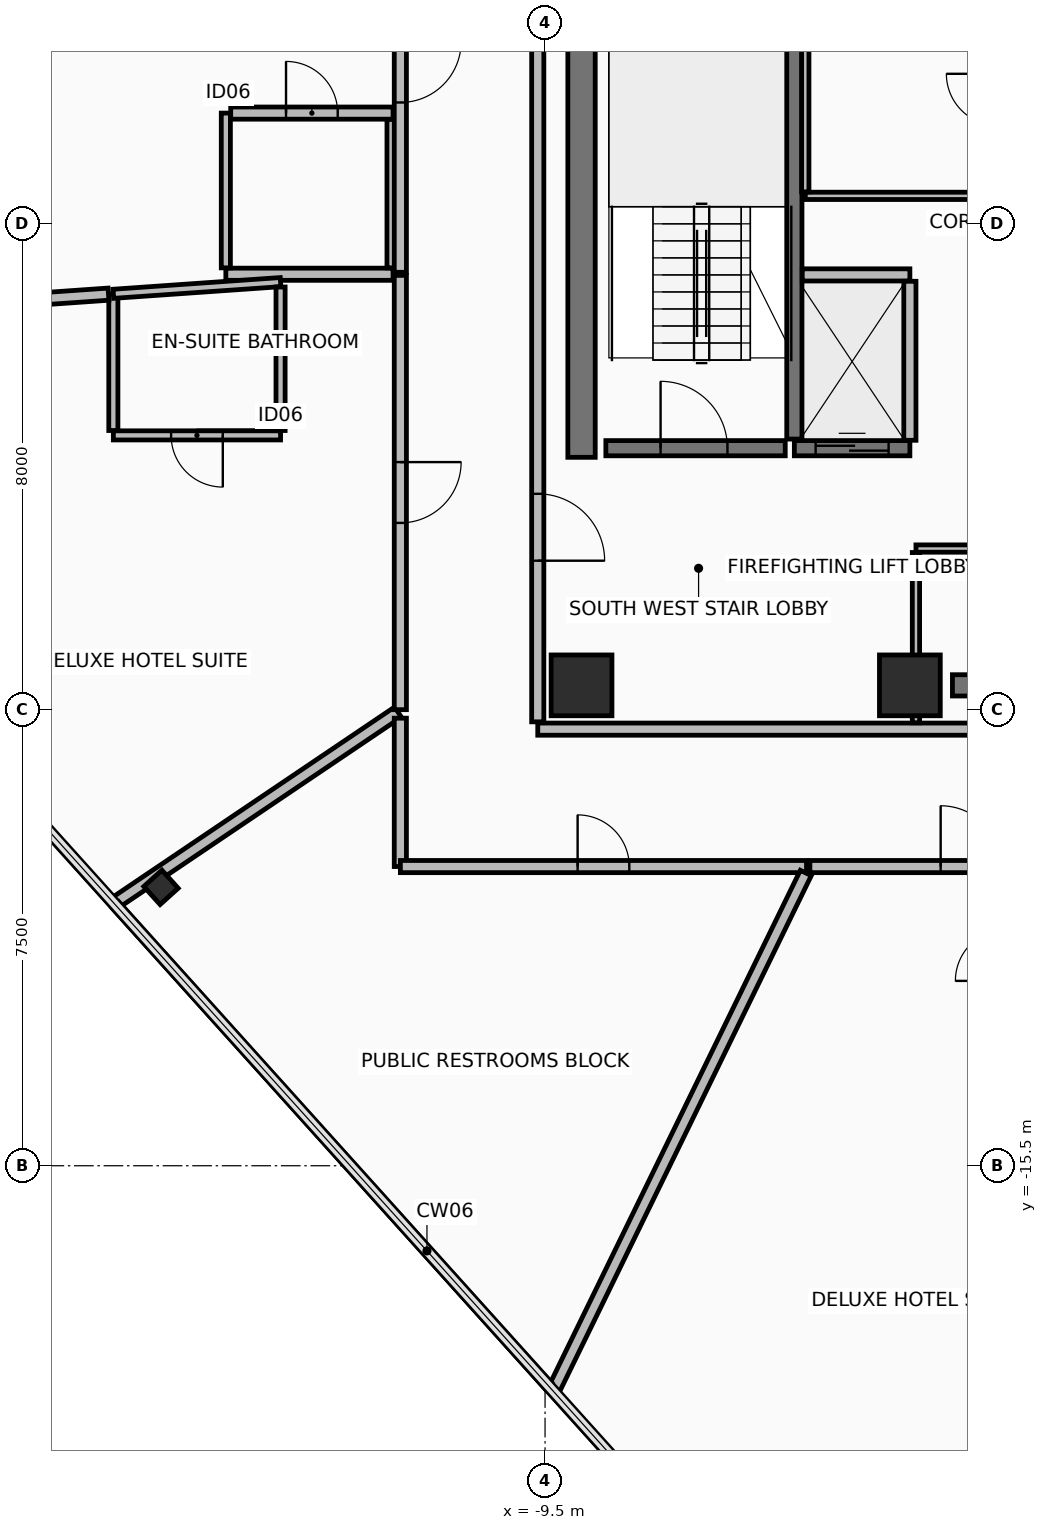
"""IFC4 building model, lengths in metres.
Left out: names, types, materials, properties, quantities, classifications, styles, units other than length and angle.
Written with IfcOpenShell. Run it as: python <this file> out.ifc"""

import sys

from ifc_helpers import new_model, si_unit, direction, frame, frame_2d, origin, origin_2d, place, context, subcontext, project, spatial, rectangle, hollow_rectangle, extrude, element, fill, save


model = new_model("IFC4")
c1 = context("Model", 3, precision=1e-05, world=origin(), true_north=direction((0.0, 1.0)))
c2 = subcontext(c1, "Body", "Model", "MODEL_VIEW")
j1 = project(units=[si_unit("LENGTHUNIT", "METRE"), si_unit("PLANEANGLEUNIT", "RADIAN")], contexts=[c1])
p1 = place(None, origin())
s1 = spatial("IfcSite", under=j1, at=p1, CompositionType="ELEMENT")
p2 = place(p1, origin())
s2 = spatial("IfcBuilding", under=s1, at=p2, CompositionType="ELEMENT")
p3 = place(p2, frame((0.0, 0.0, 279.75)))
s3 = spatial("IfcBuildingStorey", under=s2, at=p3, CompositionType="ELEMENT", Elevation=279.75)
for number, where, z_axis, x_axis in (
    (1, (-8.9, -7.6, 0.0), (0.0, 0.0, 1.0), (1.0, 0.0, 0.0)),
    (2, (-3.5, -7.6, 0.0), (0.0, 0.0, 1.0), (1.0, 0.0, 0.0)),
):
    element("IfcColumn", number, at=place(p3, frame(where, z_axis=z_axis, x_axis=x_axis)), inside=s3, PredefinedType="COLUMN", context=c2, shape_type="SweptSolid", body=[
        extrude(rectangle(XDim=1.0, YDim=1.0, at=origin_2d()), origin(), (0.0, 0.0, 1.0), 3.65),
    ])
p4 = place(p3, frame((-15.816, -10.922, -0.19), z_axis=(0.0, 0.0, 1.0), x_axis=(-0.669130606359, 0.743144825477, 0.0)))
e3 = element("IfcColumn", 3, at=p4, inside=s3, PredefinedType="COLUMN", context=c2, shape_type="SweptSolid", body=[
    extrude(hollow_rectangle(XDim=0.4, YDim=0.4, WallThickness=0.025, at=origin_2d()), origin(), (0.0, 0.0, 1.0), 3.84),
])
p5 = place(p3, frame((-2.8, -7.6, 0.0), z_axis=(0.0, 0.0, 1.0), x_axis=(1.0, 0.0, 0.0)))
e4 = element("IfcWall", 4, at=p5, inside=s3, PredefinedType="SHEAR", context=c2, shape_type="SweptSolid", body=[
    extrude(rectangle(XDim=5.38, YDim=0.35, at=frame_2d((2.69, 0.0))), origin(), (0.0, 0.0, 1.0), 3.465),
])
p6 = place(p3, frame((-8.9, -3.85, 0.0), z_axis=(0.0, 0.0, 1.0), x_axis=(0.0, 1.0, 0.0)))
e5 = element("IfcWall", 5, at=p6, inside=s3, PredefinedType="SHEAR", context=c2, shape_type="SweptSolid", body=[
    extrude(rectangle(XDim=10.7, YDim=0.45, at=frame_2d((5.35, 0.0))), origin(), (0.0, 0.0, 1.0), 3.465),
])
p7 = place(p3, frame((-9.62, -8.32, 0.0), z_axis=(0.0, 0.0, 1.0), x_axis=(1.0, 0.0, 0.0)))
e6 = element("IfcWall", 6, at=p7, inside=s3, PredefinedType="PARTITIONING", context=c2, shape_type="SweptSolid", body=[
    extrude(rectangle(XDim=19.24, YDim=0.2, at=frame_2d((9.62, 0.0))), origin(), (0.0, 0.0, 1.0), 2.96),
])
p8 = place(p7, frame((7.37, 0.0, 0.0)))
e7 = element("IfcOpeningElement", 7, at=p8, cuts=e6, PredefinedType="OPENING", context=c2, shape_type="SweptSolid", body=[
    extrude(rectangle(XDim=0.9, YDim=2.1, at=frame_2d((0.45, 1.05))), frame((0.0, 0.11, 0.0), z_axis=(0.0, -1.0, 0.0), x_axis=(1.0, 0.0, 0.0)), (0.0, 0.0, 1.0), 0.22),
])
p9 = place(p7, frame((10.77, 0.0, 0.0)))
e8 = element("IfcOpeningElement", 8, at=p9, cuts=e6, PredefinedType="OPENING", context=c2, shape_type="SweptSolid", body=[
    extrude(rectangle(XDim=0.9, YDim=2.1, at=frame_2d((0.45, 1.05))), frame((0.0, 0.11, 0.0), z_axis=(0.0, -1.0, 0.0), x_axis=(1.0, 0.0, 0.0)), (0.0, 0.0, 1.0), 0.22),
])
p10 = place(p7, frame((13.97, 0.0, 0.0)))
e9 = element("IfcOpeningElement", 9, at=p10, cuts=e6, PredefinedType="OPENING", context=c2, shape_type="SweptSolid", body=[
    extrude(rectangle(XDim=0.9, YDim=2.1, at=frame_2d((0.45, 1.05))), frame((0.0, 0.11, 0.0), z_axis=(0.0, -1.0, 0.0), x_axis=(1.0, 0.0, 0.0)), (0.0, 0.0, 1.0), 0.22),
])
p11 = place(p3, frame((-9.62, 8.2, 0.0), z_axis=(0.0, 0.0, 1.0), x_axis=(0.0, -1.0, 0.0)))
e10 = element("IfcWall", 10, at=p11, inside=s3, PredefinedType="PARTITIONING", context=c2, shape_type="SweptSolid", body=[
    extrude(rectangle(XDim=16.4, YDim=0.2, at=frame_2d((8.2, 0.0))), origin(), (0.0, 0.0, 1.0), 2.81),
])
p12 = place(p11, frame((12.65, 0.0, 0.0)))
e11 = element("IfcOpeningElement", 11, at=p12, cuts=e10, PredefinedType="OPENING", context=c2, shape_type="SweptSolid", body=[
    extrude(rectangle(XDim=1.1, YDim=2.15, at=frame_2d((0.55, 1.075))), frame((0.0, 0.11, 0.0), z_axis=(0.0, -1.0, 0.0), x_axis=(1.0, 0.0, 0.0)), (0.0, 0.0, 1.0), 0.22),
])
p13 = place(p3, frame((-5.4, -3.55, 0.0), z_axis=(0.0, 0.0, 1.0), x_axis=(0.0, 1.0, 0.0)))
e12 = element("IfcWall", 12, at=p13, inside=s3, PredefinedType="SHEAR", context=c2, shape_type="SweptSolid", body=[
    extrude(rectangle(XDim=7.3, YDim=0.25, at=frame_2d((3.65, 0.0))), origin(), (0.0, 0.0, 1.0), 3.465),
])
p14 = place(p3, frame((-8.5, -3.7, 0.0), z_axis=(0.0, 0.0, 1.0), x_axis=(1.0, 0.0, 0.0)))
e13 = element("IfcWall", 13, at=p14, inside=s3, PredefinedType="SHEAR", context=c2, shape_type="SweptSolid", body=[
    extrude(rectangle(XDim=2.95, YDim=0.25, at=frame_2d((1.475, 0.0))), origin(), (0.0, 0.0, 1.0), 3.465),
])
p15 = place(p14, frame((0.9, 0.0, 0.0)))
e14 = element("IfcOpeningElement", 14, at=p15, cuts=e13, PredefinedType="OPENING", context=c2, shape_type="SweptSolid", body=[
    extrude(rectangle(XDim=1.1, YDim=2.15, at=frame_2d((0.55, 1.075))), frame((0.0, 0.135, 0.0), z_axis=(0.0, -1.0, 0.0), x_axis=(1.0, 0.0, 0.0)), (0.0, 0.0, 1.0), 0.27),
])
p16 = place(p3, frame((-5.4, -3.7, 0.0), z_axis=(0.0, 0.0, 1.0), x_axis=(1.0, 0.0, 0.0)))
e15 = element("IfcWall", 15, at=p16, inside=s3, PredefinedType="SHEAR", context=c2, shape_type="SweptSolid", body=[
    extrude(rectangle(XDim=1.9, YDim=0.25, at=frame_2d((0.95, 0.0))), origin(), (0.0, 0.0, 1.0), 3.465),
])
p17 = place(p16, frame((0.35, 0.0, 0.0)))
e16 = element("IfcOpeningElement", 16, at=p17, cuts=e15, PredefinedType="OPENING", context=c2, shape_type="SweptSolid", body=[
    extrude(rectangle(XDim=1.2, YDim=2.2, at=frame_2d((0.6, 1.1))), frame((0.0, 0.135, 0.0), z_axis=(0.0, -1.0, 0.0), x_axis=(1.0, 0.0, 0.0)), (0.0, 0.0, 1.0), 0.27),
])
p18 = place(p3, frame((-5.27, -0.85, 0.0), z_axis=(0.0, 0.0, 1.0), x_axis=(1.0, 0.0, 0.0)))
e17 = element("IfcWall", 17, at=p18, inside=s3, PredefinedType="PARTITIONING", context=c2, shape_type="SweptSolid", body=[
    extrude(rectangle(XDim=1.77, YDim=0.2, at=frame_2d((0.885, 0.0))), origin(), (0.0, 0.0, 1.0), 3.465),
])
p19 = place(p3, frame((-3.5, -3.57, 0.0), z_axis=(0.0, 0.0, 1.0), x_axis=(0.0, 1.0, 0.0)))
e18 = element("IfcWall", 18, at=p19, inside=s3, PredefinedType="PARTITIONING", context=c2, shape_type="SweptSolid", body=[
    extrude(rectangle(XDim=2.615, YDim=0.2, at=frame_2d((1.308, 0.0))), origin(), (0.0, 0.0, 1.0), 3.465),
])
p20 = place(p3, frame((-5.22, 0.45, 0.0), z_axis=(0.0, 0.0, 1.0), x_axis=(1.0, 0.0, 0.0)))
e19 = element("IfcWall", 19, at=p20, inside=s3, PredefinedType="PARTITIONING", context=c2, shape_type="SweptSolid", body=[
    extrude(rectangle(XDim=3.17, YDim=0.12, at=frame_2d((1.585, 0.0))), origin(), (0.0, 0.0, 1.0), 3.465),
])
p21 = place(p3, frame((-5.22, 3.485, 0.0), z_axis=(0.0, 0.0, 1.0), x_axis=(0.0, -1.0, 0.0)))
e20 = element("IfcWall", 20, at=p21, inside=s3, PredefinedType="PARTITIONING", context=c2, shape_type="SweptSolid", body=[
    extrude(rectangle(XDim=2.97, YDim=0.12, at=frame_2d((1.485, 0.0))), origin(), (0.0, 0.0, 1.0), 3.465),
])
p22 = place(p3, frame((-0.265, -5.35, 0.0), z_axis=(0.0, 0.0, 1.0), x_axis=(-1.0, 0.0, 0.0)))
e21 = element("IfcWall", 21, at=p22, inside=s3, PredefinedType="PARTITIONING", context=c2, shape_type="SweptSolid", body=[
    extrude(rectangle(XDim=3.135, YDim=0.12, at=frame_2d((1.567, 0.0))), origin(), (0.0, 0.0, 1.0), 2.76),
])
p23 = place(p3, frame((-3.4, -5.415, 0.0), z_axis=(0.0, 0.0, 1.0), x_axis=(0.0, -1.0, 0.0)))
e22 = element("IfcWall", 22, at=p23, inside=s3, PredefinedType="PARTITIONING", context=c2, shape_type="SweptSolid", body=[
    extrude(rectangle(XDim=2.8, YDim=0.12, at=frame_2d((1.4, 0.0))), origin(), (0.0, 0.0, 1.0), 2.76),
])
p24 = place(p3, frame((-12.0, -0.839, 0.0), z_axis=(0.0, 0.0, 1.0), x_axis=(-1.0, 0.0, 0.0)))
e23 = element("IfcWall", 23, at=p24, inside=s3, PredefinedType="PARTITIONING", context=c2, shape_type="SweptSolid", body=[
    extrude(rectangle(XDim=2.75, YDim=0.2, at=frame_2d((1.375, 0.0))), origin(), (0.0, 0.0, 1.0), 3.465),
])
p25 = place(p3, frame((-14.75, -0.734, 0.0), z_axis=(0.0, 0.0, 1.0), x_axis=(0.0, 1.0, 0.0)))
e24 = element("IfcWall", 24, at=p25, inside=s3, PredefinedType="PARTITIONING", context=c2, shape_type="SweptSolid", body=[
    extrude(rectangle(XDim=2.545, YDim=0.15, at=frame_2d((1.272, 0.0))), origin(), (0.0, 0.0, 1.0), 3.465),
])
p26 = place(p3, frame((-14.67, 1.811, 0.0), z_axis=(0.0, 0.0, 1.0), x_axis=(1.0, 0.0, 0.0)))
e25 = element("IfcWall", 25, at=p26, inside=s3, PredefinedType="PARTITIONING", context=c2, shape_type="SweptSolid", body=[
    extrude(rectangle(XDim=2.67, YDim=0.2, at=frame_2d((1.335, 0.0))), origin(), (0.0, 0.0, 1.0), 3.465),
])
p27 = place(p26, frame((0.91, 0.0, 0.0)))
e26 = element("IfcOpeningElement", 26, at=p27, cuts=e25, PredefinedType="OPENING", context=c2, shape_type="SweptSolid", body=[
    extrude(rectangle(XDim=0.85, YDim=2.1, at=frame_2d((0.425, 1.05))), frame((0.0, 0.11, 0.0), z_axis=(0.0, -1.0, 0.0), x_axis=(1.0, 0.0, 0.0)), (0.0, 0.0, 1.0), 0.22),
])
p28 = place(p3, frame((-12.0, 1.706, 0.0), z_axis=(0.0, 0.0, 1.0), x_axis=(0.0, -1.0, 0.0)))
e27 = element("IfcWall", 27, at=p28, inside=s3, PredefinedType="PARTITIONING", context=c2, shape_type="SweptSolid", body=[
    extrude(rectangle(XDim=2.44, YDim=0.2, at=frame_2d((1.22, 0.0))), origin(), (0.0, 0.0, 1.0), 3.465),
])
p29 = place(p3, frame((-13.85, -3.489, 0.0), z_axis=(0.0, 0.0, 1.0), x_axis=(-1.0, 0.0, 0.0)))
e28 = element("IfcWall", 28, at=p29, inside=s3, PredefinedType="PARTITIONING", context=c2, shape_type="SweptSolid", body=[
    extrude(rectangle(XDim=2.75, YDim=0.15, at=frame_2d((1.375, 0.0))), origin(), (0.0, 0.0, 1.0), 3.22),
])
p30 = place(p29, frame((0.95, 0.0, 0.0)))
e29 = element("IfcOpeningElement", 29, at=p30, cuts=e28, PredefinedType="OPENING", context=c2, shape_type="SweptSolid", body=[
    extrude(rectangle(XDim=0.85, YDim=2.1, at=frame_2d((0.425, 1.05))), frame((0.0, 0.085, 0.0), z_axis=(0.0, -1.0, 0.0), x_axis=(1.0, 0.0, 0.0)), (0.0, 0.0, 1.0), 0.17),
])
p31 = place(p3, frame((-16.6, -3.409, 0.0), z_axis=(0.0, 0.0, 1.0), x_axis=(0.0, 1.0, 0.0)))
e30 = element("IfcWall", 30, at=p31, inside=s3, PredefinedType="PARTITIONING", context=c2, shape_type="SweptSolid", body=[
    extrude(rectangle(XDim=2.248, YDim=0.15, at=frame_2d((1.124, 0.0))), origin(), (0.0, 0.0, 1.0), 3.465),
])
p32 = place(p3, frame((-16.6, -1.161, 0.0), z_axis=(0.0, 0.0, 1.0), x_axis=(0.997561927417, 0.069786825178, 0.0)))
e31 = element("IfcWall", 31, at=p32, inside=s3, PredefinedType="PARTITIONING", context=c2, shape_type="SweptSolid", body=[
    extrude(rectangle(XDim=2.757, YDim=0.15, at=frame_2d((1.378, 0.0))), origin(), (0.0, 0.0, 1.0), 3.22),
])
p33 = place(p3, frame((-13.85, -1.049, 0.0), z_axis=(0.0, 0.0, 1.0), x_axis=(0.0, -1.0, 0.0)))
e32 = element("IfcWall", 32, at=p33, inside=s3, PredefinedType="PARTITIONING", context=c2, shape_type="SweptSolid", body=[
    extrude(rectangle(XDim=2.361, YDim=0.15, at=frame_2d((1.18, 0.0))), origin(), (0.0, 0.0, 1.0), 3.465),
])
p34 = place(p3, frame((-16.562, -11.171, 0.0), z_axis=(0.0, 0.0, 1.0), x_axis=(0.829047221476, 0.559178598091, 0.0)))
e33 = element("IfcWall", 33, at=p34, inside=s3, PredefinedType="PARTITIONING", context=c2, shape_type="SweptSolid", body=[
    extrude(rectangle(XDim=5.601, YDim=0.2, at=frame_2d((2.8, 0.0))), origin(), (0.0, 0.0, 1.0), 2.81),
])
p35 = place(p3, frame((-11.88, -8.14, 0.0), z_axis=(0.0, 0.0, 1.0), x_axis=(0.0, -1.0, 0.0)))
e34 = element("IfcWall", 34, at=p35, inside=s3, PredefinedType="PARTITIONING", context=c2, shape_type="SweptSolid", body=[
    extrude(rectangle(XDim=2.439, YDim=0.2, at=frame_2d((1.22, 0.0))), origin(), (0.0, 0.0, 1.0), 2.96),
])
p36 = place(p3, frame((-11.879, -10.58, 0.0), z_axis=(0.0, 0.0, 1.0), x_axis=(1.0, 0.0, 0.0)))
e35 = element("IfcWall", 35, at=p36, inside=s3, PredefinedType="PARTITIONING", context=c2, shape_type="SweptSolid", body=[
    extrude(rectangle(XDim=6.679, YDim=0.2, at=frame_2d((3.34, 0.0))), origin(), (0.0, 0.0, 1.0), 3.22),
])
p37 = place(p36, frame((2.915, 0.0, 0.0)))
e36 = element("IfcOpeningElement", 36, at=p37, cuts=e35, PredefinedType="OPENING", context=c2, shape_type="SweptSolid", body=[
    extrude(rectangle(XDim=0.85, YDim=2.1, at=frame_2d((0.425, 1.05))), frame((0.0, 0.11, 0.0), z_axis=(0.0, -1.0, 0.0), x_axis=(1.0, 0.0, 0.0)), (0.0, 0.0, 1.0), 0.22),
])
p38 = place(p3, frame((-5.211, -10.685, 0.0), z_axis=(0.0, 0.0, 1.0), x_axis=(-0.438373396373, -0.8987929491, 0.0)))
e37 = element("IfcWall", 37, at=p38, inside=s3, PredefinedType="PARTITIONING", context=c2, shape_type="SweptSolid", body=[
    extrude(rectangle(XDim=9.479, YDim=0.2, at=frame_2d((4.74, 0.0))), origin(), (0.0, 0.0, 1.0), 2.81),
])
p39 = place(p3, frame((-9.443, -19.121, 0.0), z_axis=(0.0, 0.0, 1.0), x_axis=(-0.669126879752, 0.743148180912, 0.0)))
e38 = element("IfcWall", 38, at=p39, inside=s3, PredefinedType="PARTITIONING", context=c2, shape_type="SweptSolid", body=[
    extrude(rectangle(XDim=10.647, YDim=0.15, at=frame_2d((5.323, 0.0))), origin(), (0.0, 0.0, 1.0), 3.465),
])
p40 = place(p3, frame((-11.88, 5.779, 0.0), z_axis=(0.0, 0.0, 1.0), x_axis=(0.0, -1.0, 0.0)))
e39 = element("IfcWall", 39, at=p40, inside=s3, PredefinedType="PARTITIONING", context=c2, shape_type="SweptSolid", body=[
    extrude(rectangle(XDim=6.586, YDim=0.2, at=frame_2d((3.293, 0.0))), origin(), (0.0, 0.0, 1.0), 3.465),
])
p41 = place(p40, frame((2.793, 0.0, 0.0)))
e40 = element("IfcOpeningElement", 40, at=p41, cuts=e39, PredefinedType="OPENING", context=c2, shape_type="SweptSolid", body=[
    extrude(rectangle(XDim=1.0, YDim=2.15, at=frame_2d((0.5, 1.075))), frame((0.0, 0.11, 0.0), z_axis=(0.0, -1.0, 0.0), x_axis=(1.0, 0.0, 0.0)), (0.0, 0.0, 1.0), 0.22),
])
p42 = place(p3, frame((-16.68, -1.167, 0.0), z_axis=(0.0, 0.0, 1.0), x_axis=(-0.997565152075, -0.069740715271, 0.0)))
e41 = element("IfcWall", 41, at=p42, inside=s3, PredefinedType="PARTITIONING", context=c2, shape_type="SweptSolid", body=[
    extrude(rectangle(XDim=8.409, YDim=0.2, at=frame_2d((4.204, 0.0))), origin(), (0.0, 0.0, 1.0), 2.81),
])
p43 = place(p3, frame((-11.88, -0.857, 0.0), z_axis=(0.0, 0.0, 1.0), x_axis=(0.0, -1.0, 0.0)))
e42 = element("IfcWall", 42, at=p43, inside=s3, PredefinedType="PARTITIONING", context=c2, shape_type="SweptSolid", body=[
    extrude(rectangle(XDim=7.143, YDim=0.2, at=frame_2d((3.571, 0.0))), origin(), (0.0, 0.0, 1.0), 3.465),
])
p44 = place(p43, frame((3.071, 0.0, 0.0)))
e43 = element("IfcOpeningElement", 43, at=p44, cuts=e42, PredefinedType="OPENING", context=c2, shape_type="SweptSolid", body=[
    extrude(rectangle(XDim=1.0, YDim=2.15, at=frame_2d((0.5, 1.075))), frame((0.0, 0.11, 0.0), z_axis=(0.0, -1.0, 0.0), x_axis=(1.0, 0.0, 0.0)), (0.0, 0.0, 1.0), 0.22),
])
p45 = place(p3, frame((-5.145, -10.58, 0.0), z_axis=(0.0, 0.0, 1.0), x_axis=(1.0, 0.0, 0.0)))
e44 = element("IfcWall", 44, at=p45, inside=s3, PredefinedType="PARTITIONING", context=c2, shape_type="SweptSolid", body=[
    extrude(rectangle(XDim=5.861, YDim=0.2, at=frame_2d((2.931, 0.0))), origin(), (0.0, 0.0, 1.0), 2.96),
])
p46 = place(p45, frame((2.151, 0.0, 0.0)))
e45 = element("IfcOpeningElement", 45, at=p46, cuts=e44, PredefinedType="OPENING", context=c2, shape_type="SweptSolid", body=[
    extrude(rectangle(XDim=1.0, YDim=2.15, at=frame_2d((0.5, 1.075))), frame((0.0, 0.11, 0.0), z_axis=(0.0, -1.0, 0.0), x_axis=(1.0, 0.0, 0.0)), (0.0, 0.0, 1.0), 0.22),
])
p47 = place(p12, frame((1.1, 0.0, 0.0), z_axis=(0.0, 0.0, 1.0), x_axis=(-1.0, 0.0, 0.0)))
e46 = element("IfcDoor", 46, at=p47, inside=s3, OperationType="SINGLE_SWING_LEFT", PredefinedType="DOOR", context=c2, shape_type="SweptSolid", body=[
    extrude(rectangle(XDim=1.1, YDim=2.15, at=frame_2d((0.55, 1.075))), frame((0.0, 0.025, 0.0), z_axis=(0.0, -1.0, 0.0), x_axis=(1.0, 0.0, 0.0)), (0.0, 0.0, 1.0), 0.05),
])
fill(e11, e46)
p48 = place(p15, origin())
e47 = element("IfcDoor", 47, at=p48, inside=s3, OperationType="SINGLE_SWING_LEFT", PredefinedType="DOOR", context=c2, shape_type="SweptSolid", body=[
    extrude(rectangle(XDim=1.1, YDim=2.15, at=frame_2d((0.55, 1.075))), frame((0.0, 0.025, 0.0), z_axis=(0.0, -1.0, 0.0), x_axis=(1.0, 0.0, 0.0)), (0.0, 0.0, 1.0), 0.05),
])
fill(e14, e47)
p49 = place(p17, origin())
e48 = element("IfcDoor", 48, at=p49, inside=s3, OperationType="SLIDING_TO_RIGHT", PredefinedType="DOOR", context=c2, shape_type="SweptSolid", body=[
    extrude(rectangle(XDim=1.2, YDim=2.2, at=frame_2d((0.6, 1.1))), frame((0.0, 0.025, 0.0), z_axis=(0.0, -1.0, 0.0), x_axis=(1.0, 0.0, 0.0)), (0.0, 0.0, 1.0), 0.05),
])
fill(e16, e48)
p50 = place(p27, origin())
e49 = element("IfcDoor", 49, at=p50, inside=s3, OperationType="SINGLE_SWING_RIGHT", PredefinedType="DOOR", context=c2, shape_type="SweptSolid", body=[
    extrude(rectangle(XDim=0.85, YDim=2.1, at=frame_2d((0.425, 1.05))), frame((0.0, 0.025, 0.0), z_axis=(0.0, -1.0, 0.0), x_axis=(1.0, 0.0, 0.0)), (0.0, 0.0, 1.0), 0.05),
])
fill(e26, e49)
p51 = place(p30, origin())
e50 = element("IfcDoor", 50, at=p51, inside=s3, OperationType="SINGLE_SWING_RIGHT", PredefinedType="DOOR", context=c2, shape_type="SweptSolid", body=[
    extrude(rectangle(XDim=0.85, YDim=2.1, at=frame_2d((0.425, 1.05))), frame((0.0, 0.025, 0.0), z_axis=(0.0, -1.0, 0.0), x_axis=(1.0, 0.0, 0.0)), (0.0, 0.0, 1.0), 0.05),
])
fill(e29, e50)
p52 = place(p37, origin())
e51 = element("IfcDoor", 51, at=p52, inside=s3, OperationType="SINGLE_SWING_RIGHT", PredefinedType="DOOR", context=c2, shape_type="SweptSolid", body=[
    extrude(rectangle(XDim=0.85, YDim=2.1, at=frame_2d((0.425, 1.05))), frame((0.0, 0.025, 0.0), z_axis=(0.0, -1.0, 0.0), x_axis=(1.0, 0.0, 0.0)), (0.0, 0.0, 1.0), 0.05),
])
fill(e36, e51)
p53 = place(p41, origin())
e52 = element("IfcDoor", 52, at=p53, inside=s3, OperationType="SINGLE_SWING_LEFT", PredefinedType="DOOR", context=c2, shape_type="SweptSolid", body=[
    extrude(rectangle(XDim=1.0, YDim=2.15, at=frame_2d((0.5, 1.075))), frame((0.0, 0.025, 0.0), z_axis=(0.0, -1.0, 0.0), x_axis=(1.0, 0.0, 0.0)), (0.0, 0.0, 1.0), 0.05),
])
fill(e40, e52)
p54 = place(p44, origin())
e53 = element("IfcDoor", 53, at=p54, inside=s3, OperationType="SINGLE_SWING_LEFT", PredefinedType="DOOR", context=c2, shape_type="SweptSolid", body=[
    extrude(rectangle(XDim=1.0, YDim=2.15, at=frame_2d((0.5, 1.075))), frame((0.0, 0.025, 0.0), z_axis=(0.0, -1.0, 0.0), x_axis=(1.0, 0.0, 0.0)), (0.0, 0.0, 1.0), 0.05),
])
fill(e43, e53)
p55 = place(p46, origin())
e54 = element("IfcDoor", 54, at=p55, inside=s3, OperationType="SINGLE_SWING_LEFT", PredefinedType="DOOR", context=c2, shape_type="SweptSolid", body=[
    extrude(rectangle(XDim=1.0, YDim=2.15, at=frame_2d((0.5, 1.075))), frame((0.0, 0.025, 0.0), z_axis=(0.0, -1.0, 0.0), x_axis=(1.0, 0.0, 0.0)), (0.0, 0.0, 1.0), 0.05),
])
fill(e45, e54)
save(model, sys.argv[1])
